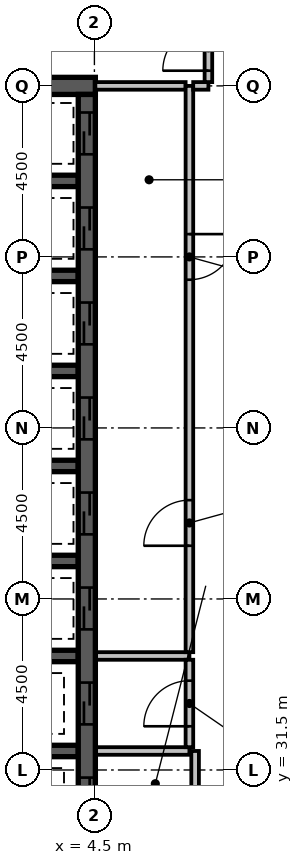
"""IFC4 building model, lengths in metres.
Left out: names, types, materials, properties, quantities, classifications, styles, units other than length and angle.
Written with IfcOpenShell. Run it as: python <this file> out.ifc"""

import sys

from ifc_helpers import new_model, si_unit, direction, frame, frame_2d, origin, place, context, subcontext, project, spatial, rectangle, extrude, element, fill, save


model = new_model("IFC4")
c1 = context("Model", 3, precision=1e-05, world=origin(), true_north=direction((0.0, 1.0)))
c2 = subcontext(c1, "Body", "Model", "MODEL_VIEW")
j1 = project(units=[si_unit("LENGTHUNIT", "METRE"), si_unit("PLANEANGLEUNIT", "RADIAN")], contexts=[c1])
p1 = place(None, origin())
s1 = spatial("IfcSite", under=j1, at=p1, CompositionType="ELEMENT")
p2 = place(p1, origin())
s2 = spatial("IfcBuilding", under=s1, at=p2, CompositionType="ELEMENT")
p3 = place(p2, frame((0.0, 0.0, 207.8)))
s3 = spatial("IfcBuildingStorey", under=s2, at=p3, CompositionType="ELEMENT", Elevation=207.8)
p4 = place(p3, frame((0.275, 49.5, -0.3), z_axis=(0.0, 0.0, 1.0), x_axis=(1.0, 0.0, 0.0)))
e1 = element("IfcWall", 1, at=p4, inside=s3, PredefinedType="SHEAR", context=c2, shape_type="SweptSolid", body=[
    extrude(rectangle(XDim=4.25, YDim=0.45, at=frame_2d((2.125, 0.0))), origin(), (0.0, 0.0, 1.0), 3.55),
])
for number, where, z_axis, x_axis in (
    (2, (0.725, 32.0, -0.3), (0.0, 0.0, 1.0), (1.0, 0.0, 0.0)),
    (3, (0.725, 34.5, -0.3), (0.0, 0.0, 1.0), (1.0, 0.0, 0.0)),
    (4, (0.725, 37.0, -0.3), (0.0, 0.0, 1.0), (1.0, 0.0, 0.0)),
    (5, (0.725, 39.5, -0.3), (0.0, 0.0, 1.0), (1.0, 0.0, 0.0)),
    (6, (0.725, 42.0, -0.3), (0.0, 0.0, 1.0), (1.0, 0.0, 0.0)),
    (7, (0.725, 44.5, -0.3), (0.0, 0.0, 1.0), (1.0, 0.0, 0.0)),
    (8, (0.725, 47.0, -0.3), (0.0, 0.0, 1.0), (1.0, 0.0, 0.0)),
):
    element("IfcWall", number, at=place(p3, frame(where, z_axis=z_axis, x_axis=x_axis)), inside=s3, PredefinedType="SHEAR", context=c2, shape_type="SweptSolid", body=[
        extrude(rectangle(XDim=3.35, YDim=0.3, at=frame_2d((1.675, 0.0))), origin(), (0.0, 0.0, 1.0), 3.55),
    ])
p5 = place(p3, frame((4.3, 27.15, -0.3), z_axis=(0.0, 0.0, 1.0), x_axis=(0.0, 1.0, 0.0)))
e9 = element("IfcWall", 9, at=p5, inside=s3, PredefinedType="SHEAR", context=c2, shape_type="SweptSolid", body=[
    extrude(rectangle(XDim=22.125, YDim=0.45, at=frame_2d((11.062, 0.0))), origin(), (0.0, 0.0, 1.0), 3.55),
])
p6 = place(p5, frame((3.05, 0.0, 0.3)))
e10 = element("IfcOpeningElement", 10, at=p6, cuts=e9, PredefinedType="OPENING", context=c2, shape_type="SweptSolid", body=[
    extrude(rectangle(XDim=1.1, YDim=2.1, at=frame_2d((0.55, 1.05))), frame((0.0, 0.237, 0.0), z_axis=(0.0, -1.0, 0.0), x_axis=(1.0, 0.0, 0.0)), (0.0, 0.0, 1.0), 0.474),
])
p7 = place(p5, frame((0.55, 0.0, 0.3)))
e11 = element("IfcOpeningElement", 11, at=p7, cuts=e9, PredefinedType="OPENING", context=c2, shape_type="SweptSolid", body=[
    extrude(rectangle(XDim=1.1, YDim=2.1, at=frame_2d((0.55, 1.05))), frame((0.0, 0.237, 0.0), z_axis=(0.0, -1.0, 0.0), x_axis=(1.0, 0.0, 0.0)), (0.0, 0.0, 1.0), 0.474),
])
p8 = place(p5, frame((20.55, 0.0, 0.3)))
e12 = element("IfcOpeningElement", 12, at=p8, cuts=e9, PredefinedType="OPENING", context=c2, shape_type="SweptSolid", body=[
    extrude(rectangle(XDim=1.1, YDim=2.1, at=frame_2d((0.55, 1.05))), frame((0.0, 0.237, 0.0), z_axis=(0.0, -1.0, 0.0), x_axis=(1.0, 0.0, 0.0)), (0.0, 0.0, 1.0), 0.474),
])
p9 = place(p5, frame((18.05, 0.0, 0.3)))
e13 = element("IfcOpeningElement", 13, at=p9, cuts=e9, PredefinedType="OPENING", context=c2, shape_type="SweptSolid", body=[
    extrude(rectangle(XDim=1.1, YDim=2.1, at=frame_2d((0.55, 1.05))), frame((0.0, 0.237, 0.0), z_axis=(0.0, -1.0, 0.0), x_axis=(1.0, 0.0, 0.0)), (0.0, 0.0, 1.0), 0.474),
])
p10 = place(p5, frame((15.55, 0.0, 0.3)))
e14 = element("IfcOpeningElement", 14, at=p10, cuts=e9, PredefinedType="OPENING", context=c2, shape_type="SweptSolid", body=[
    extrude(rectangle(XDim=1.1, YDim=2.1, at=frame_2d((0.55, 1.05))), frame((0.0, 0.237, 0.0), z_axis=(0.0, -1.0, 0.0), x_axis=(1.0, 0.0, 0.0)), (0.0, 0.0, 1.0), 0.474),
])
p11 = place(p5, frame((13.05, 0.0, 0.3)))
e15 = element("IfcOpeningElement", 15, at=p11, cuts=e9, PredefinedType="OPENING", context=c2, shape_type="SweptSolid", body=[
    extrude(rectangle(XDim=1.1, YDim=2.1, at=frame_2d((0.55, 1.05))), frame((0.0, 0.237, 0.0), z_axis=(0.0, -1.0, 0.0), x_axis=(1.0, 0.0, 0.0)), (0.0, 0.0, 1.0), 0.474),
])
p12 = place(p5, frame((10.55, 0.0, 0.3)))
e16 = element("IfcOpeningElement", 16, at=p12, cuts=e9, PredefinedType="OPENING", context=c2, shape_type="SweptSolid", body=[
    extrude(rectangle(XDim=1.1, YDim=2.1, at=frame_2d((0.55, 1.05))), frame((0.0, 0.237, 0.0), z_axis=(0.0, -1.0, 0.0), x_axis=(1.0, 0.0, 0.0)), (0.0, 0.0, 1.0), 0.474),
])
p13 = place(p5, frame((8.05, 0.0, 0.3)))
e17 = element("IfcOpeningElement", 17, at=p13, cuts=e9, PredefinedType="OPENING", context=c2, shape_type="SweptSolid", body=[
    extrude(rectangle(XDim=1.1, YDim=2.1, at=frame_2d((0.55, 1.05))), frame((0.0, 0.237, 0.0), z_axis=(0.0, -1.0, 0.0), x_axis=(1.0, 0.0, 0.0)), (0.0, 0.0, 1.0), 0.474),
])
p14 = place(p5, frame((5.55, 0.0, 0.3)))
e18 = element("IfcOpeningElement", 18, at=p14, cuts=e9, PredefinedType="OPENING", context=c2, shape_type="SweptSolid", body=[
    extrude(rectangle(XDim=1.1, YDim=2.1, at=frame_2d((0.55, 1.05))), frame((0.0, 0.237, 0.0), z_axis=(0.0, -1.0, 0.0), x_axis=(1.0, 0.0, 0.0)), (0.0, 0.0, 1.0), 0.474),
])
p15 = place(p3, frame((4.545, 34.5, 0.0), z_axis=(0.0, 0.0, 1.0), x_axis=(1.0, 0.0, 0.0)))
e19 = element("IfcWall", 19, at=p15, inside=s3, PredefinedType="PARTITIONING", context=c2, shape_type="SweptSolid", body=[
    extrude(rectangle(XDim=2.455, YDim=0.2, at=frame_2d((1.228, 0.0))), origin(), (0.0, 0.0, 1.0), 3.25),
])
p16 = place(p3, frame((7.0, 34.6, 0.0), z_axis=(0.0, 0.0, 1.0), x_axis=(0.0, 1.0, 0.0)))
e20 = element("IfcWall", 20, at=p16, inside=s3, PredefinedType="PARTITIONING", context=c2, shape_type="SweptSolid", body=[
    extrude(rectangle(XDim=14.9, YDim=0.2, at=frame_2d((7.45, 0.0))), origin(), (0.0, 0.0, 1.0), 3.25),
])
p17 = place(p16, frame((2.8, 0.0, 0.0)))
e21 = element("IfcOpeningElement", 21, at=p17, cuts=e20, PredefinedType="OPENING", context=c2, shape_type="SweptSolid", body=[
    extrude(rectangle(XDim=1.2, YDim=2.1, at=frame_2d((0.6, 1.05))), frame((0.0, 0.112, 0.0), z_axis=(0.0, -1.0, 0.0), x_axis=(1.0, 0.0, 0.0)), (0.0, 0.0, 1.0), 0.224),
])
p18 = place(p16, frame((9.8, 0.0, 0.0)))
e22 = element("IfcOpeningElement", 22, at=p18, cuts=e20, PredefinedType="OPENING", context=c2, shape_type="SweptSolid", body=[
    extrude(rectangle(XDim=1.2, YDim=2.1, at=frame_2d((0.6, 1.05))), frame((0.0, 0.112, 0.0), z_axis=(0.0, -1.0, 0.0), x_axis=(1.0, 0.0, 0.0)), (0.0, 0.0, 1.0), 0.224),
])
p19 = place(p3, frame((4.525, 49.5, 0.0), z_axis=(0.0, 0.0, 1.0), x_axis=(1.0, 0.0, 0.0)))
e23 = element("IfcWall", 23, at=p19, inside=s3, PredefinedType="PARTITIONING", context=c2, shape_type="SweptSolid", body=[
    extrude(rectangle(XDim=2.375, YDim=0.2, at=frame_2d((1.188, 0.0))), origin(), (0.0, 0.0, 1.0), 3.25),
])
p20 = place(p3, frame((4.545, 32.0, 0.0), z_axis=(0.0, 0.0, 1.0), x_axis=(1.0, 0.0, 0.0)))
e24 = element("IfcWall", 24, at=p20, inside=s3, PredefinedType="PARTITIONING", context=c2, shape_type="SweptSolid", body=[
    extrude(rectangle(XDim=2.455, YDim=0.2, at=frame_2d((1.228, 0.0))), origin(), (0.0, 0.0, 1.0), 3.25),
])
p21 = place(p3, frame((7.0, 32.1, 0.0), z_axis=(0.0, 0.0, 1.0), x_axis=(0.0, 1.0, 0.0)))
e25 = element("IfcWall", 25, at=p21, inside=s3, PredefinedType="PARTITIONING", context=c2, shape_type="SweptSolid", body=[
    extrude(rectangle(XDim=2.3, YDim=0.2, at=frame_2d((1.15, 0.0))), origin(), (0.0, 0.0, 1.0), 3.25),
])
p22 = place(p21, frame((0.55, 0.0, 0.0)))
e26 = element("IfcOpeningElement", 26, at=p22, cuts=e25, PredefinedType="OPENING", context=c2, shape_type="SweptSolid", body=[
    extrude(rectangle(XDim=1.2, YDim=2.1, at=frame_2d((0.6, 1.05))), frame((0.0, 0.112, 0.0), z_axis=(0.0, -1.0, 0.0), x_axis=(1.0, 0.0, 0.0)), (0.0, 0.0, 1.0), 0.224),
])
p23 = place(p3, frame((7.15, 27.17, 0.0), z_axis=(0.0, 0.0, 1.0), x_axis=(0.0, 1.0, 0.0)))
e27 = element("IfcWall", 27, at=p23, inside=s3, PredefinedType="PARTITIONING", context=c2, shape_type="SweptSolid", body=[
    extrude(rectangle(XDim=4.83, YDim=0.2, at=frame_2d((2.415, 0.0))), origin(), (0.0, 0.0, 1.0), 3.25),
])
p24 = place(p23, frame((1.73, 0.0, 0.0)))
e28 = element("IfcOpeningElement", 28, at=p24, cuts=e27, PredefinedType="OPENING", context=c2, shape_type="SweptSolid", body=[
    extrude(rectangle(XDim=1.2, YDim=2.1, at=frame_2d((0.6, 1.05))), frame((0.0, 0.112, 0.0), z_axis=(0.0, -1.0, 0.0), x_axis=(1.0, 0.0, 0.0)), (0.0, 0.0, 1.0), 0.224),
])
p25 = place(p3, frame((7.1, 49.5, 0.0), z_axis=(0.0, 0.0, 1.0), x_axis=(1.0, 0.0, 0.0)))
e29 = element("IfcWall", 29, at=p25, inside=s3, PredefinedType="PARTITIONING", context=c2, shape_type="SweptSolid", body=[
    extrude(rectangle(XDim=0.4, YDim=0.2, at=frame_2d((0.2, 0.0))), origin(), (0.0, 0.0, 1.0), 3.25),
])
p26 = place(p3, frame((7.5, 49.6, 0.0), z_axis=(0.0, 0.0, 1.0), x_axis=(0.0, 1.0, 0.0)))
e30 = element("IfcWall", 30, at=p26, inside=s3, PredefinedType="PARTITIONING", context=c2, shape_type="SweptSolid", body=[
    extrude(rectangle(XDim=3.9, YDim=0.2, at=frame_2d((1.95, 0.0))), origin(), (0.0, 0.0, 1.0), 3.25),
])
p27 = place(p26, frame((0.3, 0.0, 0.0)))
e31 = element("IfcOpeningElement", 31, at=p27, cuts=e30, PredefinedType="OPENING", context=c2, shape_type="SweptSolid", body=[
    extrude(rectangle(XDim=1.2, YDim=2.1, at=frame_2d((0.6, 1.05))), frame((0.0, 0.112, 0.0), z_axis=(0.0, -1.0, 0.0), x_axis=(1.0, 0.0, 0.0)), (0.0, 0.0, 1.0), 0.224),
])
p28 = place(p27, origin())
e32 = element("IfcDoor", 32, at=p28, inside=s3, OperationType="SINGLE_SWING_LEFT", PredefinedType="DOOR", context=c2, shape_type="SweptSolid", body=[
    extrude(rectangle(XDim=1.2, YDim=2.1, at=frame_2d((0.6, 1.05))), frame((0.0, 0.025, 0.0), z_axis=(0.0, -1.0, 0.0), x_axis=(1.0, 0.0, 0.0)), (0.0, 0.0, 1.0), 0.05),
])
fill(e31, e32)
p29 = place(p6, origin())
e33 = element("IfcDoor", 33, at=p29, inside=s3, OperationType="SLIDING_TO_LEFT", PredefinedType="DOOR", context=c2, shape_type="SweptSolid", body=[
    extrude(rectangle(XDim=1.1, YDim=2.1, at=frame_2d((0.55, 1.05))), frame((0.0, 0.025, 0.0), z_axis=(0.0, -1.0, 0.0), x_axis=(1.0, 0.0, 0.0)), (0.0, 0.0, 1.0), 0.05),
])
fill(e10, e33)
p30 = place(p8, origin())
e34 = element("IfcDoor", 34, at=p30, inside=s3, OperationType="SLIDING_TO_LEFT", PredefinedType="DOOR", context=c2, shape_type="SweptSolid", body=[
    extrude(rectangle(XDim=1.1, YDim=2.1, at=frame_2d((0.55, 1.05))), frame((0.0, 0.025, 0.0), z_axis=(0.0, -1.0, 0.0), x_axis=(1.0, 0.0, 0.0)), (0.0, 0.0, 1.0), 0.05),
])
fill(e12, e34)
p31 = place(p9, origin())
e35 = element("IfcDoor", 35, at=p31, inside=s3, OperationType="SLIDING_TO_LEFT", PredefinedType="DOOR", context=c2, shape_type="SweptSolid", body=[
    extrude(rectangle(XDim=1.1, YDim=2.1, at=frame_2d((0.55, 1.05))), frame((0.0, 0.025, 0.0), z_axis=(0.0, -1.0, 0.0), x_axis=(1.0, 0.0, 0.0)), (0.0, 0.0, 1.0), 0.05),
])
fill(e13, e35)
p32 = place(p10, origin())
e36 = element("IfcDoor", 36, at=p32, inside=s3, OperationType="SLIDING_TO_LEFT", PredefinedType="DOOR", context=c2, shape_type="SweptSolid", body=[
    extrude(rectangle(XDim=1.1, YDim=2.1, at=frame_2d((0.55, 1.05))), frame((0.0, 0.025, 0.0), z_axis=(0.0, -1.0, 0.0), x_axis=(1.0, 0.0, 0.0)), (0.0, 0.0, 1.0), 0.05),
])
fill(e14, e36)
p33 = place(p11, origin())
e37 = element("IfcDoor", 37, at=p33, inside=s3, OperationType="SLIDING_TO_LEFT", PredefinedType="DOOR", context=c2, shape_type="SweptSolid", body=[
    extrude(rectangle(XDim=1.1, YDim=2.1, at=frame_2d((0.55, 1.05))), frame((0.0, 0.025, 0.0), z_axis=(0.0, -1.0, 0.0), x_axis=(1.0, 0.0, 0.0)), (0.0, 0.0, 1.0), 0.05),
])
fill(e15, e37)
p34 = place(p12, origin())
e38 = element("IfcDoor", 38, at=p34, inside=s3, OperationType="SLIDING_TO_LEFT", PredefinedType="DOOR", context=c2, shape_type="SweptSolid", body=[
    extrude(rectangle(XDim=1.1, YDim=2.1, at=frame_2d((0.55, 1.05))), frame((0.0, 0.025, 0.0), z_axis=(0.0, -1.0, 0.0), x_axis=(1.0, 0.0, 0.0)), (0.0, 0.0, 1.0), 0.05),
])
fill(e16, e38)
p35 = place(p13, origin())
e39 = element("IfcDoor", 39, at=p35, inside=s3, OperationType="SLIDING_TO_LEFT", PredefinedType="DOOR", context=c2, shape_type="SweptSolid", body=[
    extrude(rectangle(XDim=1.1, YDim=2.1, at=frame_2d((0.55, 1.05))), frame((0.0, 0.025, 0.0), z_axis=(0.0, -1.0, 0.0), x_axis=(1.0, 0.0, 0.0)), (0.0, 0.0, 1.0), 0.05),
])
fill(e17, e39)
p36 = place(p17, origin())
e40 = element("IfcDoor", 40, at=p36, inside=s3, OperationType="SINGLE_SWING_LEFT", PredefinedType="DOOR", context=c2, shape_type="SweptSolid", body=[
    extrude(rectangle(XDim=1.2, YDim=2.1, at=frame_2d((0.6, 1.05))), frame((0.0, 0.025, 0.0), z_axis=(0.0, -1.0, 0.0), x_axis=(1.0, 0.0, 0.0)), (0.0, 0.0, 1.0), 0.05),
])
fill(e21, e40)
p37 = place(p18, origin())
e41 = element("IfcDoor", 41, at=p37, inside=s3, OperationType="SINGLE_SWING_RIGHT", PredefinedType="DOOR", context=c2, shape_type="SweptSolid", body=[
    extrude(rectangle(XDim=1.2, YDim=2.1, at=frame_2d((0.6, 1.05))), frame((0.0, 0.025, 0.0), z_axis=(0.0, -1.0, 0.0), x_axis=(1.0, 0.0, 0.0)), (0.0, 0.0, 1.0), 0.05),
])
fill(e22, e41)
p38 = place(p22, origin())
e42 = element("IfcDoor", 42, at=p38, inside=s3, OperationType="SINGLE_SWING_LEFT", PredefinedType="DOOR", context=c2, shape_type="SweptSolid", body=[
    extrude(rectangle(XDim=1.2, YDim=2.1, at=frame_2d((0.6, 1.05))), frame((0.0, 0.025, 0.0), z_axis=(0.0, -1.0, 0.0), x_axis=(1.0, 0.0, 0.0)), (0.0, 0.0, 1.0), 0.05),
])
fill(e26, e42)
p39 = place(p14, origin())
e43 = element("IfcDoor", 43, at=p39, inside=s3, OperationType="SLIDING_TO_LEFT", PredefinedType="DOOR", context=c2, shape_type="SweptSolid", body=[
    extrude(rectangle(XDim=1.1, YDim=2.1, at=frame_2d((0.55, 1.05))), frame((0.0, 0.025, 0.0), z_axis=(0.0, -1.0, 0.0), x_axis=(1.0, 0.0, 0.0)), (0.0, 0.0, 1.0), 0.05),
])
fill(e18, e43)
save(model, sys.argv[1])
